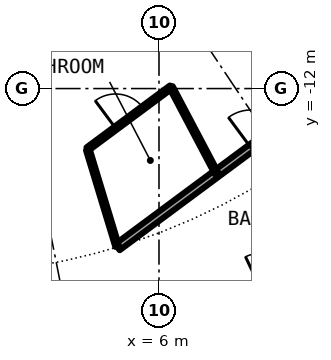
"""IFC4 building model, lengths in metres.
Left out: names, types, materials, properties, quantities, classifications, styles, units other than length and angle.
Written with IfcOpenShell. Run it as: python <this file> out.ifc"""

import sys

from ifc_helpers import new_model, si_unit, direction, frame, frame_2d, origin, place, context, subcontext, project, spatial, rectangle, extrude, element, fill, save


model = new_model("IFC4")
c1 = context("Model", 3, precision=1e-05, world=origin(), true_north=direction((0.0, 1.0)))
c2 = subcontext(c1, "Body", "Model", "MODEL_VIEW")
j1 = project(units=[si_unit("LENGTHUNIT", "METRE"), si_unit("PLANEANGLEUNIT", "RADIAN")], contexts=[c1])
p1 = place(None, origin())
s1 = spatial("IfcSite", under=j1, at=p1, CompositionType="ELEMENT")
p2 = place(p1, origin())
s2 = spatial("IfcBuilding", under=s1, at=p2, CompositionType="ELEMENT")
p3 = place(p2, frame((0.0, 0.0, 117.75)))
s3 = spatial("IfcBuildingStorey", under=s2, at=p3, CompositionType="ELEMENT", Elevation=117.75)
p4 = place(p3, frame((5.686, -18.758, 0.0), z_axis=(0.0, 0.0, 1.0), x_axis=(0.903961383505, 0.427614098379, 0.0)))
e1 = element("IfcWall", 1, at=p4, inside=s3, PredefinedType="PARTITIONING", context=c2, shape_type="SweptSolid", body=[
    extrude(rectangle(XDim=5.601, YDim=0.2, at=frame_2d((2.8, 0.0))), origin(), (0.0, 0.0, 1.0), 2.39),
])
p5 = place(p4, frame((3.339, 0.0, 0.0)))
e2 = element("IfcOpeningElement", 2, at=p5, cuts=e1, PredefinedType="OPENING", context=c2, shape_type="SweptSolid", body=[
    extrude(rectangle(XDim=1.0, YDim=2.3, at=frame_2d((0.5, 1.15))), frame((0.0, 0.11, 0.0), z_axis=(0.0, -1.0, 0.0), x_axis=(1.0, 0.0, 0.0)), (0.0, 0.0, 1.0), 0.22),
])
p6 = place(p3, frame((4.906, -16.172, 0.0), z_axis=(0.0, 0.0, 1.0), x_axis=(0.803204584823, 0.59570327758, 0.0)))
e3 = element("IfcWall", 3, at=p6, inside=s3, PredefinedType="PARTITIONING", context=c2, shape_type="SweptSolid", body=[
    extrude(rectangle(XDim=11.387, YDim=0.2, at=frame_2d((5.693, 0.0))), origin(), (0.0, 0.0, 1.0), 2.7),
])
p7 = place(p6, frame((4.38, 0.0, 0.0)))
e4 = element("IfcOpeningElement", 4, at=p7, cuts=e3, PredefinedType="OPENING", context=c2, shape_type="SweptSolid", body=[
    extrude(rectangle(XDim=1.0, YDim=2.3, at=frame_2d((0.5, 1.15))), frame((0.0, 0.11, 0.0), z_axis=(0.0, -1.0, 0.0), x_axis=(1.0, 0.0, 0.0)), (0.0, 0.0, 1.0), 0.22),
])
p8 = place(p3, frame((4.122, -13.589, 0.0), z_axis=(0.0, 0.0, 1.0), x_axis=(0.803128348509, 0.595806055542, 0.0)))
e5 = element("IfcWall", 5, at=p8, inside=s3, PredefinedType="PARTITIONING", context=c2, shape_type="SweptSolid", body=[
    extrude(rectangle(XDim=2.734, YDim=0.1, at=frame_2d((1.367, 0.0))), origin(), (0.0, 0.0, 1.0), 2.7),
])
p9 = place(p8, frame((0.917, 0.0, 0.0)))
e6 = element("IfcOpeningElement", 6, at=p9, cuts=e5, PredefinedType="OPENING", context=c2, shape_type="SweptSolid", body=[
    extrude(rectangle(XDim=0.9, YDim=2.3, at=frame_2d((0.45, 1.15))), frame((0.0, 0.06, 0.0), z_axis=(0.0, -1.0, 0.0), x_axis=(1.0, 0.0, 0.0)), (0.0, 0.0, 1.0), 0.12),
])
p10 = place(p3, frame((4.908, -5.959, 0.0), z_axis=(0.0, 0.0, 1.0), x_axis=(0.636105207978, -0.771602335652, 0.0)))
e7 = element("IfcWall", 7, at=p10, inside=s3, PredefinedType="PARTITIONING", context=c2, shape_type="SweptSolid", body=[
    extrude(rectangle(XDim=8.213, YDim=0.1, at=frame_2d((4.106, 0.0))), origin(), (0.0, 0.0, 1.0), 2.7),
])
p11 = place(p10, frame((6.49, 0.0, 0.0)))
e8 = element("IfcOpeningElement", 8, at=p11, cuts=e7, PredefinedType="OPENING", context=c2, shape_type="SweptSolid", body=[
    extrude(rectangle(XDim=0.9, YDim=2.3, at=frame_2d((0.45, 1.15))), frame((0.0, 0.06, 0.0), z_axis=(0.0, -1.0, 0.0), x_axis=(1.0, 0.0, 0.0)), (0.0, 0.0, 1.0), 0.12),
])
p12 = place(p10, frame((2.384, 0.0, 0.0)))
e9 = element("IfcOpeningElement", 9, at=p12, cuts=e7, PredefinedType="OPENING", context=c2, shape_type="SweptSolid", body=[
    extrude(rectangle(XDim=0.9, YDim=2.3, at=frame_2d((0.45, 1.15))), frame((0.0, 0.06, 0.0), z_axis=(0.0, -1.0, 0.0), x_axis=(1.0, 0.0, 0.0)), (0.0, 0.0, 1.0), 0.12),
])
p13 = place(p3, frame((6.316, -11.961, 0.0), z_axis=(0.0, 0.0, 1.0), x_axis=(0.467037016128, -0.884237765291, 0.0)))
e10 = element("IfcWall", 10, at=p13, inside=s3, PredefinedType="PARTITIONING", context=c2, shape_type="SweptSolid", body=[
    extrude(rectangle(XDim=2.572, YDim=0.1, at=frame_2d((1.286, 0.0))), origin(), (0.0, 0.0, 1.0), 2.7),
])
p14 = place(p3, frame((4.9, -16.152, 0.0), z_axis=(0.0, 0.0, 1.0), x_axis=(-0.290456070925, 0.956888327269, 0.0)))
e11 = element("IfcWall", 11, at=p14, inside=s3, PredefinedType="PARTITIONING", context=c2, shape_type="SweptSolid", body=[
    extrude(rectangle(XDim=2.658, YDim=0.1, at=frame_2d((1.329, 0.0))), origin(), (0.0, 0.0, 1.0), 2.7),
])
p15 = place(p7, origin())
e12 = element("IfcDoor", 12, at=p15, inside=s3, OperationType="SINGLE_SWING_LEFT", PredefinedType="DOOR", context=c2, shape_type="SweptSolid", body=[
    extrude(rectangle(XDim=1.0, YDim=2.3, at=frame_2d((0.5, 1.15))), frame((0.0, 0.025, 0.0), z_axis=(0.0, -1.0, 0.0), x_axis=(1.0, 0.0, 0.0)), (0.0, 0.0, 1.0), 0.05),
])
fill(e4, e12)
p16 = place(p9, origin())
e13 = element("IfcDoor", 13, at=p16, inside=s3, OperationType="SINGLE_SWING_RIGHT", PredefinedType="DOOR", context=c2, shape_type="SweptSolid", body=[
    extrude(rectangle(XDim=0.9, YDim=2.3, at=frame_2d((0.45, 1.15))), frame((0.0, 0.025, 0.0), z_axis=(0.0, -1.0, 0.0), x_axis=(1.0, 0.0, 0.0)), (0.0, 0.0, 1.0), 0.05),
])
fill(e6, e13)
save(model, sys.argv[1])
